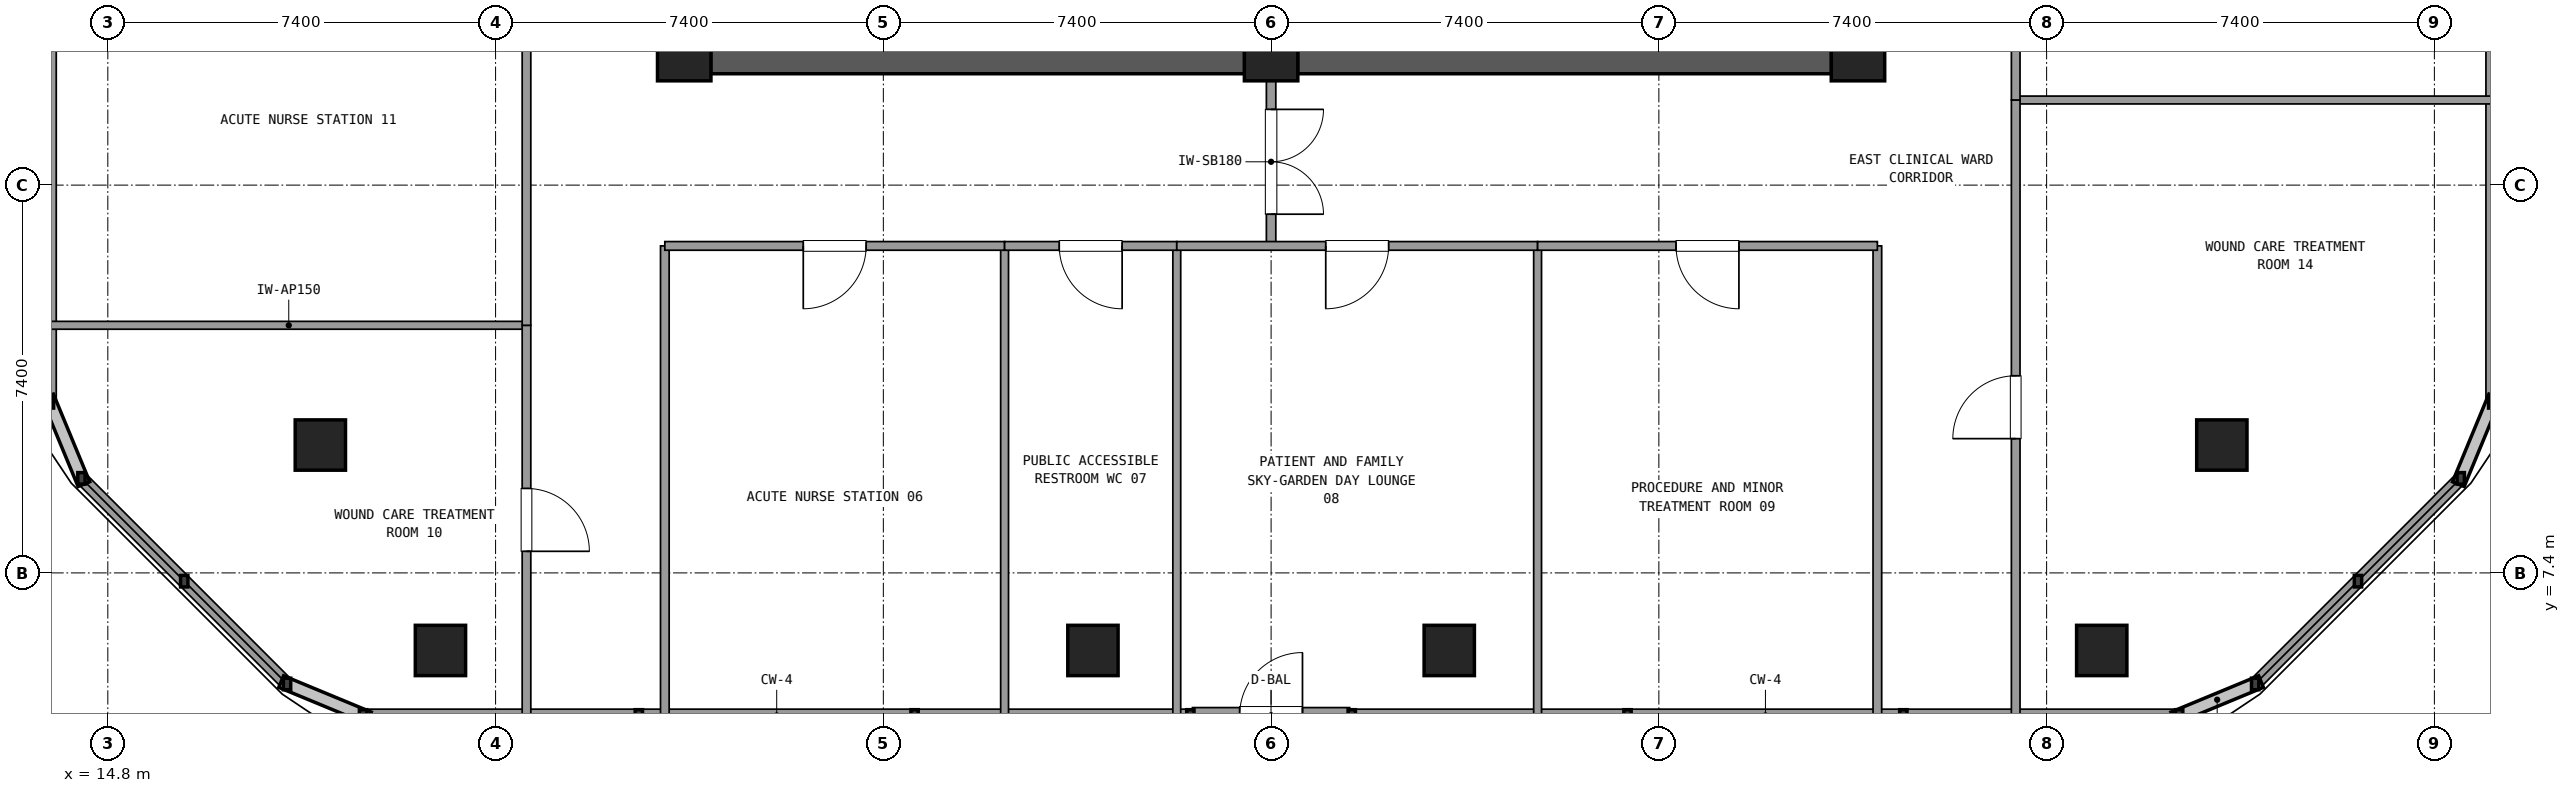
"""IFC4 building model, lengths in metres.
Left out: names, types, materials, properties, quantities, classifications, styles, units other than length and angle.
Written with IfcOpenShell. Run it as: python <this file> out.ifc"""

import sys

from ifc_helpers import new_model, si_unit, direction, frame, frame_2d, origin, origin_2d, place, context, subcontext, project, spatial, rectangle, extrude, element, fill, save


model = new_model("IFC4")
c1 = context("Model", 3, precision=1e-05, world=origin(), true_north=direction((0.0, 1.0)))
c2 = subcontext(c1, "Body", "Model", "MODEL_VIEW")
j1 = project(units=[si_unit("LENGTHUNIT", "METRE"), si_unit("PLANEANGLEUNIT", "RADIAN")], contexts=[c1])
p1 = place(None, origin())
s1 = spatial("IfcSite", under=j1, at=p1, CompositionType="ELEMENT")
p2 = place(p1, origin())
s2 = spatial("IfcBuilding", under=s1, at=p2, CompositionType="ELEMENT")
p3 = place(p2, frame((0.0, 0.0, 138.42)))
s3 = spatial("IfcBuildingStorey", under=s2, at=p3, CompositionType="ELEMENT", Elevation=138.42)
for number, where, z_axis, x_axis in (
    (1, (25.8, 17.3, 0.0), (0.0, 0.0, 1.0), (1.0, 0.0, 0.0)),
    (2, (37.0, 17.3, 0.0), (0.0, 0.0, 1.0), (1.0, 0.0, 0.0)),
    (3, (48.2, 17.3, 0.0), (0.0, 0.0, 1.0), (1.0, 0.0, 0.0)),
):
    element("IfcColumn", number, at=place(p3, frame(where, z_axis=z_axis, x_axis=x_axis)), inside=s3, PredefinedType="COLUMN", context=c2, shape_type="SweptSolid", body=[
        extrude(rectangle(XDim=1.02, YDim=1.02, at=origin_2d()), origin(), (0.0, 0.0, 1.0), 3.6),
    ])
for number, where, z_axis, x_axis in (
    (4, (26.305, 17.3, 0.0), (0.0, 0.0, 1.0), (1.0, 0.0, 0.0)),
    (5, (37.505, 17.3, 0.0), (0.0, 0.0, 1.0), (1.0, 0.0, 0.0)),
):
    element("IfcWall", number, at=place(p3, frame(where, z_axis=z_axis, x_axis=x_axis)), inside=s3, PredefinedType="SHEAR", context=c2, shape_type="SweptSolid", body=[
        extrude(rectangle(XDim=10.19, YDim=0.75, at=frame_2d((5.095, 0.0))), origin(), (0.0, 0.0, 1.0), 3.32),
    ])
for number, where, z_axis, x_axis in (
    (6, (18.856, 9.84, 0.0), (0.0, 0.0, 1.0), (1.0, 0.0, 0.0)),
    (7, (21.148, 5.92, 0.0), (0.0, 0.0, 1.0), (1.0, 0.0, 0.0)),
    (8, (33.6, 5.92, 0.0), (0.0, 0.0, 1.0), (1.0, 0.0, 0.0)),
    (9, (40.4, 5.92, 0.0), (0.0, 0.0, 1.0), (1.0, 0.0, 0.0)),
    (10, (52.852, 5.92, 0.0), (0.0, 0.0, 1.0), (1.0, 0.0, 0.0)),
    (11, (55.144, 9.84, 0.0), (0.0, 0.0, 1.0), (1.0, 0.0, 0.0)),
):
    element("IfcColumn", number, at=place(p3, frame(where, z_axis=z_axis, x_axis=x_axis)), inside=s3, PredefinedType="COLUMN", context=c2, shape_type="SweptSolid", body=[
        extrude(rectangle(XDim=0.96, YDim=0.96, at=origin_2d()), origin(), (0.0, 0.0, 1.0), 3.6),
    ])
p4 = place(p3, frame((35.499, 4.68, 0.0), z_axis=(0.0, 0.0, 1.0), x_axis=(1.0, 0.0, 0.0)))
e12 = element("IfcWall", 12, at=p4, inside=s3, PredefinedType="SOLIDWALL", context=c2, shape_type="SweptSolid", body=[
    extrude(rectangle(XDim=3.0, YDim=0.3, at=frame_2d((1.5, 0.0))), origin(), (0.0, 0.0, 1.0), 2.67),
])
p5 = place(p4, frame((0.9, 0.0, 0.0)))
e13 = element("IfcOpeningElement", 13, at=p5, cuts=e12, PredefinedType="OPENING", context=c2, shape_type="SweptSolid", body=[
    extrude(rectangle(XDim=1.2, YDim=2.2, at=frame_2d((0.6, 1.1))), frame((0.0, 0.16, 0.0), z_axis=(0.0, -1.0, 0.0), x_axis=(1.0, 0.0, 0.0)), (0.0, 0.0, 1.0), 0.32),
])
p6 = place(p3, frame((19.671, 4.68, 0.0), z_axis=(0.0, 0.0, 1.0), x_axis=(1.0, 0.0, 0.0)))
e14 = element("IfcWall", 14, at=p6, inside=s3, PredefinedType="SOLIDWALL", context=c2, shape_type="SweptSolid", body=[
    extrude(rectangle(XDim=15.788, YDim=0.24, at=frame_2d((7.894, 0.0))), origin(), (0.0, 0.0, 1.0), 0.85),
])
p7 = place(p3, frame((38.539, 4.68, 0.0), z_axis=(0.0, 0.0, 1.0), x_axis=(1.0, 0.0, 0.0)))
e15 = element("IfcWall", 15, at=p7, inside=s3, PredefinedType="SOLIDWALL", context=c2, shape_type="SweptSolid", body=[
    extrude(rectangle(XDim=15.79, YDim=0.24, at=frame_2d((7.895, 0.0))), origin(), (0.0, 0.0, 1.0), 0.85),
])
p8 = place(p3, frame((55.78, 5.281, 0.0), z_axis=(0.0, 0.0, 1.0), x_axis=(0.707084777957, 0.707128783731, 0.0)))
e16 = element("IfcWall", 16, at=p8, inside=s3, PredefinedType="SOLIDWALL", context=c2, shape_type="SweptSolid", body=[
    extrude(rectangle(XDim=5.548, YDim=0.24, at=frame_2d((2.774, 0.0))), origin(), (0.0, 0.0, 1.0), 0.85),
])
for number, where, z_axis, x_axis in (
    (17, (60.304, 10.655, 0.0), (0.0, 0.0, 1.0), (0.0, 1.0, 0.0)),
    (18, (13.696, 41.145, 0.0), (0.0, 0.0, 1.0), (0.0, -1.0, 0.0)),
):
    element("IfcWall", number, at=place(p3, frame(where, z_axis=z_axis, x_axis=x_axis)), inside=s3, PredefinedType="SOLIDWALL", context=c2, shape_type="SweptSolid", body=[
        extrude(rectangle(XDim=30.49, YDim=0.24, at=frame_2d((15.245, 0.0))), origin(), (0.0, 0.0, 1.0), 0.85),
    ])
p9 = place(p3, frame((14.297, 9.204, 0.0), z_axis=(0.0, 0.0, 1.0), x_axis=(0.707084777957, -0.707128783731, 0.0)))
e19 = element("IfcWall", 19, at=p9, inside=s3, PredefinedType="SOLIDWALL", context=c2, shape_type="SweptSolid", body=[
    extrude(rectangle(XDim=5.548, YDim=0.24, at=frame_2d((2.774, 0.0))), origin(), (0.0, 0.0, 1.0), 0.85),
])
p10 = place(p3, frame((37.0, 13.64, 0.0), z_axis=(0.0, 0.0, 1.0), x_axis=(0.0, 1.0, 0.0)))
e20 = element("IfcWall", 20, at=p10, inside=s3, PredefinedType="PARTITIONING", context=c2, shape_type="SweptSolid", body=[
    extrude(rectangle(XDim=3.21, YDim=0.18, at=frame_2d((1.605, 0.0))), origin(), (0.0, 0.0, 1.0), 2.61),
])
p11 = place(p10, frame((0.605, 0.0, 0.0)))
e21 = element("IfcOpeningElement", 21, at=p11, cuts=e20, PredefinedType="OPENING", context=c2, shape_type="SweptSolid", body=[
    extrude(rectangle(XDim=2.0, YDim=2.2, at=frame_2d((1.0, 1.1))), frame((0.0, 0.1, 0.0), z_axis=(0.0, -1.0, 0.0), x_axis=(1.0, 0.0, 0.0)), (0.0, 0.0, 1.0), 0.2),
])
for number, where, z_axis, x_axis in (
    (22, (25.43, 4.7, 0.0), (0.0, 0.0, 1.0), (0.0, 1.0, 0.0)),
    (23, (48.57, 4.7, 0.0), (0.0, 0.0, 1.0), (0.0, 1.0, 0.0)),
):
    element("IfcWall", number, at=place(p3, frame(where, z_axis=z_axis, x_axis=x_axis)), inside=s3, PredefinedType="PARTITIONING", context=c2, shape_type="SweptSolid", body=[
        extrude(rectangle(XDim=8.94, YDim=0.165, at=frame_2d((4.47, 0.0))), origin(), (0.0, 0.0, 1.0), 2.61),
    ])
p12 = place(p3, frame((31.914, 13.64, 0.0), z_axis=(0.0, 0.0, 1.0), x_axis=(0.0, -1.0, 0.0)))
e24 = element("IfcWall", 24, at=p12, inside=s3, PredefinedType="PARTITIONING", context=c2, shape_type="SweptSolid", body=[
    extrude(rectangle(XDim=8.94, YDim=0.15, at=frame_2d((4.47, 0.0))), origin(), (0.0, 0.0, 1.0), 2.61),
])
p13 = place(p3, frame((25.43, 13.64, 0.0), z_axis=(0.0, 0.0, 1.0), x_axis=(1.0, 0.0, 0.0)))
e25 = element("IfcWall", 25, at=p13, inside=s3, PredefinedType="PARTITIONING", context=c2, shape_type="SweptSolid", body=[
    extrude(rectangle(XDim=6.484, YDim=0.165, at=frame_2d((3.242, 0.0))), origin(), (0.0, 0.0, 1.0), 2.61),
])
p14 = place(p13, frame((2.642, 0.0, 0.0)))
e26 = element("IfcOpeningElement", 26, at=p14, cuts=e25, PredefinedType="OPENING", context=c2, shape_type="SweptSolid", body=[
    extrude(rectangle(XDim=1.2, YDim=2.15, at=frame_2d((0.6, 1.075))), frame((0.0, 0.093, 0.0), z_axis=(0.0, -1.0, 0.0), x_axis=(1.0, 0.0, 0.0)), (0.0, 0.0, 1.0), 0.185),
])
p15 = place(p3, frame((35.2, 13.64, 0.0), z_axis=(0.0, 0.0, 1.0), x_axis=(0.0, -1.0, 0.0)))
e27 = element("IfcWall", 27, at=p15, inside=s3, PredefinedType="PARTITIONING", context=c2, shape_type="SweptSolid", body=[
    extrude(rectangle(XDim=8.94, YDim=0.15, at=frame_2d((4.47, 0.0))), origin(), (0.0, 0.0, 1.0), 2.61),
])
p16 = place(p3, frame((31.914, 13.64, 0.0), z_axis=(0.0, 0.0, 1.0), x_axis=(1.0, 0.0, 0.0)))
e28 = element("IfcWall", 28, at=p16, inside=s3, PredefinedType="PARTITIONING", context=c2, shape_type="SweptSolid", body=[
    extrude(rectangle(XDim=3.286, YDim=0.165, at=frame_2d((1.643, 0.0))), origin(), (0.0, 0.0, 1.0), 2.61),
])
p17 = place(p16, frame((1.043, 0.0, 0.0)))
e29 = element("IfcOpeningElement", 29, at=p17, cuts=e28, PredefinedType="OPENING", context=c2, shape_type="SweptSolid", body=[
    extrude(rectangle(XDim=1.2, YDim=2.15, at=frame_2d((0.6, 1.075))), frame((0.0, 0.093, 0.0), z_axis=(0.0, -1.0, 0.0), x_axis=(1.0, 0.0, 0.0)), (0.0, 0.0, 1.0), 0.185),
])
p18 = place(p3, frame((42.086, 13.64, 0.0), z_axis=(0.0, 0.0, 1.0), x_axis=(0.0, -1.0, 0.0)))
e30 = element("IfcWall", 30, at=p18, inside=s3, PredefinedType="PARTITIONING", context=c2, shape_type="SweptSolid", body=[
    extrude(rectangle(XDim=8.94, YDim=0.15, at=frame_2d((4.47, 0.0))), origin(), (0.0, 0.0, 1.0), 2.61),
])
p19 = place(p3, frame((35.2, 13.64, 0.0), z_axis=(0.0, 0.0, 1.0), x_axis=(1.0, 0.0, 0.0)))
e31 = element("IfcWall", 31, at=p19, inside=s3, PredefinedType="PARTITIONING", context=c2, shape_type="SweptSolid", body=[
    extrude(rectangle(XDim=6.886, YDim=0.165, at=frame_2d((3.443, 0.0))), origin(), (0.0, 0.0, 1.0), 2.61),
])
p20 = place(p19, frame((2.843, 0.0, 0.0)))
e32 = element("IfcOpeningElement", 32, at=p20, cuts=e31, PredefinedType="OPENING", context=c2, shape_type="SweptSolid", body=[
    extrude(rectangle(XDim=1.2, YDim=2.15, at=frame_2d((0.6, 1.075))), frame((0.0, 0.093, 0.0), z_axis=(0.0, -1.0, 0.0), x_axis=(1.0, 0.0, 0.0)), (0.0, 0.0, 1.0), 0.185),
])
p21 = place(p3, frame((42.086, 13.64, 0.0), z_axis=(0.0, 0.0, 1.0), x_axis=(1.0, 0.0, 0.0)))
e33 = element("IfcWall", 33, at=p21, inside=s3, PredefinedType="PARTITIONING", context=c2, shape_type="SweptSolid", body=[
    extrude(rectangle(XDim=6.484, YDim=0.165, at=frame_2d((3.242, 0.0))), origin(), (0.0, 0.0, 1.0), 2.61),
])
p22 = place(p21, frame((2.642, 0.0, 0.0)))
e34 = element("IfcOpeningElement", 34, at=p22, cuts=e33, PredefinedType="OPENING", context=c2, shape_type="SweptSolid", body=[
    extrude(rectangle(XDim=1.2, YDim=2.15, at=frame_2d((0.6, 1.075))), frame((0.0, 0.093, 0.0), z_axis=(0.0, -1.0, 0.0), x_axis=(1.0, 0.0, 0.0)), (0.0, 0.0, 1.0), 0.185),
])
p23 = place(p3, frame((22.79, 12.125, 0.0), z_axis=(0.0, 0.0, 1.0), x_axis=(-1.0, 0.0, 0.0)))
e35 = element("IfcWall", 35, at=p23, inside=s3, PredefinedType="PARTITIONING", context=c2, shape_type="SweptSolid", body=[
    extrude(rectangle(XDim=9.074, YDim=0.15, at=frame_2d((4.537, 0.0))), origin(), (0.0, 0.0, 1.0), 2.61),
])
p24 = place(p3, frame((22.79, 4.7, 0.0), z_axis=(0.0, 0.0, 1.0), x_axis=(0.0, 1.0, 0.0)))
e36 = element("IfcWall", 36, at=p24, inside=s3, PredefinedType="PARTITIONING", context=c2, shape_type="SweptSolid", body=[
    extrude(rectangle(XDim=7.425, YDim=0.165, at=frame_2d((3.712, 0.0))), origin(), (0.0, 0.0, 1.0), 2.61),
])
p25 = place(p24, frame((3.112, 0.0, 0.0)))
e37 = element("IfcOpeningElement", 37, at=p25, cuts=e36, PredefinedType="OPENING", context=c2, shape_type="SweptSolid", body=[
    extrude(rectangle(XDim=1.2, YDim=2.15, at=frame_2d((0.6, 1.075))), frame((0.0, 0.093, 0.0), z_axis=(0.0, -1.0, 0.0), x_axis=(1.0, 0.0, 0.0)), (0.0, 0.0, 1.0), 0.185),
])
p26 = place(p3, frame((22.79, 12.125, 0.0), z_axis=(0.0, 0.0, 1.0), x_axis=(0.0, 1.0, 0.0)))
e38 = element("IfcWall", 38, at=p26, inside=s3, PredefinedType="PARTITIONING", context=c2, shape_type="SweptSolid", body=[
    extrude(rectangle(XDim=12.115, YDim=0.165, at=frame_2d((6.058, 0.0))), origin(), (0.0, 0.0, 1.0), 2.61),
])
p27 = place(p26, frame((5.457, 0.0, 0.0)))
e39 = element("IfcOpeningElement", 39, at=p27, cuts=e38, PredefinedType="OPENING", context=c2, shape_type="SweptSolid", body=[
    extrude(rectangle(XDim=1.2, YDim=2.15, at=frame_2d((0.6, 1.075))), frame((0.0, 0.093, 0.0), z_axis=(0.0, -1.0, 0.0), x_axis=(1.0, 0.0, 0.0)), (0.0, 0.0, 1.0), 0.185),
])
p28 = place(p3, frame((51.21, 16.424, 0.0), z_axis=(0.0, 0.0, 1.0), x_axis=(1.0, 0.0, 0.0)))
e40 = element("IfcWall", 40, at=p28, inside=s3, PredefinedType="PARTITIONING", context=c2, shape_type="SweptSolid", body=[
    extrude(rectangle(XDim=9.074, YDim=0.15, at=frame_2d((4.537, 0.0))), origin(), (0.0, 0.0, 1.0), 2.61),
])
p29 = place(p3, frame((51.21, 4.7, 0.0), z_axis=(0.0, 0.0, 1.0), x_axis=(0.0, 1.0, 0.0)))
e41 = element("IfcWall", 41, at=p29, inside=s3, PredefinedType="PARTITIONING", context=c2, shape_type="SweptSolid", body=[
    extrude(rectangle(XDim=11.724, YDim=0.165, at=frame_2d((5.862, 0.0))), origin(), (0.0, 0.0, 1.0), 2.61),
])
p30 = place(p29, frame((5.262, 0.0, 0.0)))
e42 = element("IfcOpeningElement", 42, at=p30, cuts=e41, PredefinedType="OPENING", context=c2, shape_type="SweptSolid", body=[
    extrude(rectangle(XDim=1.2, YDim=2.15, at=frame_2d((0.6, 1.075))), frame((0.0, 0.093, 0.0), z_axis=(0.0, -1.0, 0.0), x_axis=(1.0, 0.0, 0.0)), (0.0, 0.0, 1.0), 0.185),
])
p31 = place(p3, frame((51.21, 16.424, 0.0), z_axis=(0.0, 0.0, 1.0), x_axis=(0.0, 1.0, 0.0)))
e43 = element("IfcWall", 43, at=p31, inside=s3, PredefinedType="PARTITIONING", context=c2, shape_type="SweptSolid", body=[
    extrude(rectangle(XDim=7.816, YDim=0.165, at=frame_2d((3.908, 0.0))), origin(), (0.0, 0.0, 1.0), 2.61),
])
p32 = place(p31, frame((3.308, 0.0, 0.0)))
e44 = element("IfcOpeningElement", 44, at=p32, cuts=e43, PredefinedType="OPENING", context=c2, shape_type="SweptSolid", body=[
    extrude(rectangle(XDim=1.2, YDim=2.15, at=frame_2d((0.6, 1.075))), frame((0.0, 0.093, 0.0), z_axis=(0.0, -1.0, 0.0), x_axis=(1.0, 0.0, 0.0)), (0.0, 0.0, 1.0), 0.185),
])
p33 = place(p11, frame((2.0, 0.0, 0.0), z_axis=(0.0, 0.0, 1.0), x_axis=(-1.0, 0.0, 0.0)))
e45 = element("IfcDoor", 45, at=p33, inside=s3, OperationType="DOUBLE_DOOR_SINGLE_SWING", PredefinedType="DOOR", context=c2, shape_type="SweptSolid", body=[
    extrude(rectangle(XDim=2.0, YDim=2.2, at=frame_2d((1.0, 1.1))), frame((0.0, 0.025, 0.0), z_axis=(0.0, -1.0, 0.0), x_axis=(1.0, 0.0, 0.0)), (0.0, 0.0, 1.0), 0.05),
])
fill(e21, e45)
p34 = place(p14, frame((1.2, 0.0, 0.0), z_axis=(0.0, 0.0, 1.0), x_axis=(-1.0, 0.0, 0.0)))
e46 = element("IfcDoor", 46, at=p34, inside=s3, OperationType="SINGLE_SWING_LEFT", PredefinedType="DOOR", context=c2, shape_type="SweptSolid", body=[
    extrude(rectangle(XDim=1.2, YDim=2.15, at=frame_2d((0.6, 1.075))), frame((0.0, 0.025, 0.0), z_axis=(0.0, -1.0, 0.0), x_axis=(1.0, 0.0, 0.0)), (0.0, 0.0, 1.0), 0.05),
])
fill(e26, e46)
p35 = place(p17, frame((1.2, 0.0, 0.0), z_axis=(0.0, 0.0, 1.0), x_axis=(-1.0, 0.0, 0.0)))
e47 = element("IfcDoor", 47, at=p35, inside=s3, OperationType="SINGLE_SWING_RIGHT", PredefinedType="DOOR", context=c2, shape_type="SweptSolid", body=[
    extrude(rectangle(XDim=1.2, YDim=2.15, at=frame_2d((0.6, 1.075))), frame((0.0, 0.025, 0.0), z_axis=(0.0, -1.0, 0.0), x_axis=(1.0, 0.0, 0.0)), (0.0, 0.0, 1.0), 0.05),
])
fill(e29, e47)
p36 = place(p20, frame((1.2, 0.0, 0.0), z_axis=(0.0, 0.0, 1.0), x_axis=(-1.0, 0.0, 0.0)))
e48 = element("IfcDoor", 48, at=p36, inside=s3, OperationType="SINGLE_SWING_LEFT", PredefinedType="DOOR", context=c2, shape_type="SweptSolid", body=[
    extrude(rectangle(XDim=1.2, YDim=2.15, at=frame_2d((0.6, 1.075))), frame((0.0, 0.025, 0.0), z_axis=(0.0, -1.0, 0.0), x_axis=(1.0, 0.0, 0.0)), (0.0, 0.0, 1.0), 0.05),
])
fill(e32, e48)
p37 = place(p22, frame((1.2, 0.0, 0.0), z_axis=(0.0, 0.0, 1.0), x_axis=(-1.0, 0.0, 0.0)))
e49 = element("IfcDoor", 49, at=p37, inside=s3, OperationType="SINGLE_SWING_RIGHT", PredefinedType="DOOR", context=c2, shape_type="SweptSolid", body=[
    extrude(rectangle(XDim=1.2, YDim=2.15, at=frame_2d((0.6, 1.075))), frame((0.0, 0.025, 0.0), z_axis=(0.0, -1.0, 0.0), x_axis=(1.0, 0.0, 0.0)), (0.0, 0.0, 1.0), 0.05),
])
fill(e34, e49)
p38 = place(p25, frame((1.2, 0.0, 0.0), z_axis=(0.0, 0.0, 1.0), x_axis=(-1.0, 0.0, 0.0)))
e50 = element("IfcDoor", 50, at=p38, inside=s3, OperationType="SINGLE_SWING_LEFT", PredefinedType="DOOR", context=c2, shape_type="SweptSolid", body=[
    extrude(rectangle(XDim=1.2, YDim=2.15, at=frame_2d((0.6, 1.075))), frame((0.0, 0.025, 0.0), z_axis=(0.0, -1.0, 0.0), x_axis=(1.0, 0.0, 0.0)), (0.0, 0.0, 1.0), 0.05),
])
fill(e37, e50)
p39 = place(p30, origin())
e51 = element("IfcDoor", 51, at=p39, inside=s3, OperationType="SINGLE_SWING_LEFT", PredefinedType="DOOR", context=c2, shape_type="SweptSolid", body=[
    extrude(rectangle(XDim=1.2, YDim=2.15, at=frame_2d((0.6, 1.075))), frame((0.0, 0.025, 0.0), z_axis=(0.0, -1.0, 0.0), x_axis=(1.0, 0.0, 0.0)), (0.0, 0.0, 1.0), 0.05),
])
fill(e42, e51)
save(model, sys.argv[1])
